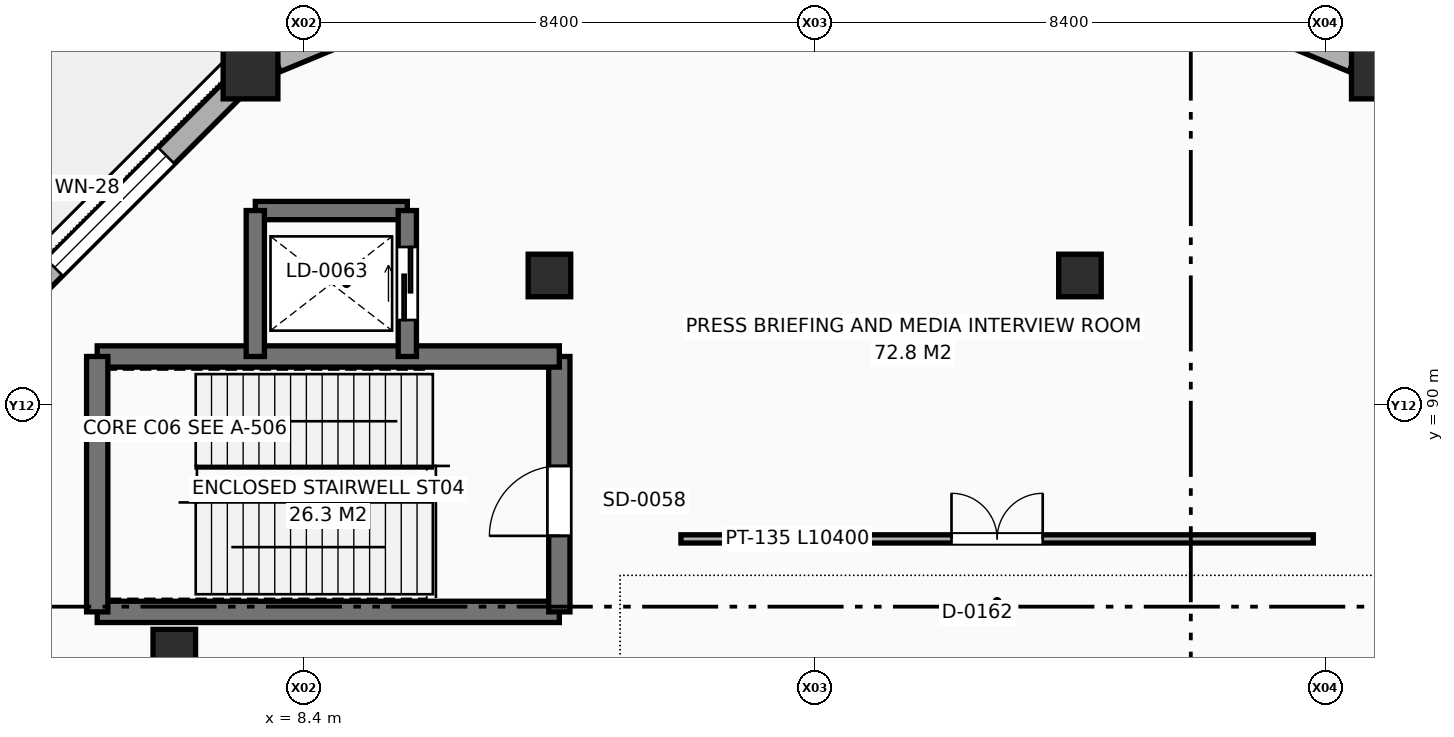
"""IFC4 building model, lengths in metres.
Left out: names, types, materials, properties, quantities, classifications, styles, units other than length and angle.
Written with IfcOpenShell. Run it as: python <this file> out.ifc"""

import sys

from ifc_helpers import new_model, si_unit, direction, frame, frame_2d, origin, origin_2d, place, context, subcontext, project, spatial, rectangle, circle, extrude, element, fill, save


model = new_model("IFC4")
c1 = context("Model", 3, precision=1e-05, world=origin(), true_north=direction((0.0, 1.0)))
c2 = subcontext(c1, "Body", "Model", "MODEL_VIEW")
j1 = project(units=[si_unit("LENGTHUNIT", "METRE"), si_unit("PLANEANGLEUNIT", "RADIAN")], contexts=[c1])
p1 = place(None, origin())
s1 = spatial("IfcSite", under=j1, at=p1, CompositionType="ELEMENT")
p2 = place(p1, origin())
s2 = spatial("IfcBuilding", under=s1, at=p2, CompositionType="ELEMENT")
p3 = place(p2, origin())
s3 = spatial("IfcBuildingStorey", under=s2, at=p3, CompositionType="ELEMENT", Elevation=0.0)
for number, where, z_axis, x_axis in (
    (1, (26.079, 95.486, 0.0), (0.0, 0.0, 1.0), (1.0, 0.0, 0.0)),
    (2, (7.521, 95.486, 0.0), (0.0, 0.0, 1.0), (1.0, 0.0, 0.0)),
):
    element("IfcColumn", number, at=place(p3, frame(where, z_axis=z_axis, x_axis=x_axis)), inside=s3, PredefinedType="COLUMN", context=c2, shape_type="SweptSolid", body=[
        extrude(circle(Radius=0.45, at=origin_2d()), origin(), (0.0, 0.0, 1.0), 5.4),
    ])
for number, where, z_axis, x_axis in (
    (3, (21.163, 92.132, 0.0), (0.0, 0.0, 1.0), (1.0, 0.0, 0.0)),
    (4, (12.438, 92.132, 0.0), (0.0, 0.0, 1.0), (1.0, 0.0, 0.0)),
    (5, (6.268, 85.963, 0.0), (0.0, 0.0, 1.0), (1.0, 0.0, 0.0)),
):
    element("IfcColumn", number, at=place(p3, frame(where, z_axis=z_axis, x_axis=x_axis)), inside=s3, PredefinedType="COLUMN", context=c2, shape_type="SweptSolid", body=[
        extrude(circle(Radius=0.35, at=origin_2d()), origin(), (0.0, 0.0, 1.0), 5.4),
    ])
p4 = place(p3, frame((25.661, 95.659, 0.0), z_axis=(0.0, 0.0, 1.0), x_axis=(-0.923880572778, 0.382680920931, 0.0)))
e6 = element("IfcWall", 6, at=p4, inside=s3, PredefinedType="SOLIDWALL", context=c2, shape_type="SweptSolid", body=[
    extrude(rectangle(XDim=5.612, YDim=0.38, at=frame_2d((2.806, 0.0))), origin(), (0.0, 0.0, 1.0), 4.33),
])
p5 = place(p4, frame((1.881, 0.0, 0.9)))
e7 = element("IfcOpeningElement", 7, at=p5, cuts=e6, PredefinedType="OPENING", context=c2, shape_type="SweptSolid", body=[
    extrude(rectangle(XDim=1.85, YDim=1.5, at=frame_2d((0.925, 0.75))), frame((0.0, 0.2, 0.0), z_axis=(0.0, -1.0, 0.0), x_axis=(1.0, 0.0, 0.0)), (0.0, 0.0, 1.0), 0.4),
])
p6 = place(p3, frame((13.124, 97.807, 0.0), z_axis=(0.0, 0.0, 1.0), x_axis=(-0.923880572778, -0.382680920931, 0.0)))
e8 = element("IfcWall", 8, at=p6, inside=s3, PredefinedType="SOLIDWALL", context=c2, shape_type="SweptSolid", body=[
    extrude(rectangle(XDim=5.612, YDim=0.38, at=frame_2d((2.806, 0.0))), origin(), (0.0, 0.0, 1.0), 4.33),
])
p7 = place(p6, frame((1.681, 0.0, 0.9)))
e9 = element("IfcOpeningElement", 9, at=p7, cuts=e8, PredefinedType="OPENING", context=c2, shape_type="SweptSolid", body=[
    extrude(rectangle(XDim=2.25, YDim=1.5, at=frame_2d((1.125, 0.75))), frame((0.0, 0.2, 0.0), z_axis=(0.0, -1.0, 0.0), x_axis=(1.0, 0.0, 0.0)), (0.0, 0.0, 1.0), 0.4),
])
p8 = place(p3, frame((7.202, 95.167, 0.0), z_axis=(0.0, 0.0, 1.0), x_axis=(-0.707085031082, -0.707128530622, 0.0)))
e10 = element("IfcWall", 10, at=p8, inside=s3, PredefinedType="SOLIDWALL", context=c2, shape_type="SweptSolid", body=[
    extrude(rectangle(XDim=5.613, YDim=0.38, at=frame_2d((2.806, 0.0))), origin(), (0.0, 0.0, 1.0), 4.33),
])
p9 = place(p8, frame((1.506, 0.0, 0.9)))
e11 = element("IfcOpeningElement", 11, at=p9, cuts=e10, PredefinedType="OPENING", context=c2, shape_type="SweptSolid", body=[
    extrude(rectangle(XDim=2.6, YDim=1.6, at=frame_2d((1.3, 0.8))), frame((0.0, 0.2, 0.0), z_axis=(0.0, -1.0, 0.0), x_axis=(1.0, 0.0, 0.0)), (0.0, 0.0, 1.0), 0.4),
])
p10 = place(p3, frame((5.0, 86.6, 0.0), z_axis=(0.0, 0.0, 1.0), x_axis=(1.0, 0.0, 0.0)))
e12 = element("IfcWall", 12, at=p10, inside=s3, PredefinedType="SHEAR", context=c2, shape_type="SweptSolid", body=[
    extrude(rectangle(XDim=7.6, YDim=0.35, at=frame_2d((3.8, 0.0))), origin(), (0.0, 0.0, 1.0), 5.12),
])
p11 = place(p3, frame((12.6, 86.6, 0.0), z_axis=(0.0, 0.0, 1.0), x_axis=(0.0, 1.0, 0.0)))
e13 = element("IfcWall", 13, at=p11, inside=s3, PredefinedType="SHEAR", context=c2, shape_type="SweptSolid", body=[
    extrude(rectangle(XDim=4.2, YDim=0.35, at=frame_2d((2.1, 0.0))), origin(), (0.0, 0.0, 1.0), 5.12),
])
p12 = place(p11, frame((1.25, 0.0, 0.0)))
e14 = element("IfcOpeningElement", 14, at=p12, cuts=e13, PredefinedType="OPENING", context=c2, shape_type="SweptSolid", body=[
    extrude(rectangle(XDim=1.15, YDim=2.2, at=frame_2d((0.575, 1.1))), frame((0.0, 0.185, 0.0), z_axis=(0.0, -1.0, 0.0), x_axis=(1.0, 0.0, 0.0)), (0.0, 0.0, 1.0), 0.37),
])
p13 = place(p3, frame((12.6, 90.8, 0.0), z_axis=(0.0, 0.0, 1.0), x_axis=(-1.0, 0.0, 0.0)))
e15 = element("IfcWall", 15, at=p13, inside=s3, PredefinedType="SHEAR", context=c2, shape_type="SweptSolid", body=[
    extrude(rectangle(XDim=7.6, YDim=0.35, at=frame_2d((3.8, 0.0))), origin(), (0.0, 0.0, 1.0), 5.12),
])
p14 = place(p3, frame((5.0, 90.8, 0.0), z_axis=(0.0, 0.0, 1.0), x_axis=(0.0, -1.0, 0.0)))
e16 = element("IfcWall", 16, at=p14, inside=s3, PredefinedType="SHEAR", context=c2, shape_type="SweptSolid", body=[
    extrude(rectangle(XDim=4.2, YDim=0.35, at=frame_2d((2.1, 0.0))), origin(), (0.0, 0.0, 1.0), 5.12),
])
p15 = place(p3, frame((10.1, 93.2, 0.0), z_axis=(0.0, 0.0, 1.0), x_axis=(-1.0, 0.0, 0.0)))
e17 = element("IfcWall", 17, at=p15, inside=s3, PredefinedType="SHEAR", context=c2, shape_type="SweptSolid", body=[
    extrude(rectangle(XDim=2.5, YDim=0.3, at=frame_2d((1.25, 0.0))), origin(), (0.0, 0.0, 1.0), 5.12),
])
p16 = place(p3, frame((7.6, 93.2, 0.0), z_axis=(0.0, 0.0, 1.0), x_axis=(0.0, -1.0, 0.0)))
e18 = element("IfcWall", 18, at=p16, inside=s3, PredefinedType="SHEAR", context=c2, shape_type="SweptSolid", body=[
    extrude(rectangle(XDim=2.4, YDim=0.3, at=frame_2d((1.2, 0.0))), origin(), (0.0, 0.0, 1.0), 5.12),
])
p17 = place(p3, frame((10.1, 90.8, 0.0), z_axis=(0.0, 0.0, 1.0), x_axis=(0.0, 1.0, 0.0)))
e19 = element("IfcWall", 19, at=p17, inside=s3, PredefinedType="SHEAR", context=c2, shape_type="SweptSolid", body=[
    extrude(rectangle(XDim=2.4, YDim=0.3, at=frame_2d((1.2, 0.0))), origin(), (0.0, 0.0, 1.0), 5.12),
])
p18 = place(p17, frame((0.6, 0.0, 0.0)))
e20 = element("IfcOpeningElement", 20, at=p18, cuts=e19, PredefinedType="OPENING", context=c2, shape_type="SweptSolid", body=[
    extrude(rectangle(XDim=1.2, YDim=2.25, at=frame_2d((0.6, 1.125))), frame((0.0, 0.16, 0.0), z_axis=(0.0, -1.0, 0.0), x_axis=(1.0, 0.0, 0.0)), (0.0, 0.0, 1.0), 0.32),
])
p19 = place(p3, frame((14.6, 87.8, 0.0), z_axis=(0.0, 0.0, 1.0), x_axis=(1.0, 0.0, 0.0)))
e21 = element("IfcWall", 21, at=p19, inside=s3, PredefinedType="PARTITIONING", context=c2, shape_type="SweptSolid", body=[
    extrude(rectangle(XDim=10.4, YDim=0.135, at=frame_2d((5.2, 0.0))), origin(), (0.0, 0.0, 1.0), 5.06),
])
p20 = place(p19, frame((4.45, 0.0, 0.0)))
e22 = element("IfcOpeningElement", 22, at=p20, cuts=e21, PredefinedType="OPENING", context=c2, shape_type="SweptSolid", body=[
    extrude(rectangle(XDim=1.5, YDim=2.35, at=frame_2d((0.75, 1.175))), frame((0.0, 0.077, 0.0), z_axis=(0.0, -1.0, 0.0), x_axis=(1.0, 0.0, 0.0)), (0.0, 0.0, 1.0), 0.155),
])
p21 = place(p9, origin())
e23 = element("IfcWindow", 23, at=p21, inside=s3, PartitioningType="SINGLE_PANEL", PredefinedType="WINDOW", context=c2, shape_type="SweptSolid", body=[
    extrude(rectangle(XDim=2.6, YDim=1.6, at=frame_2d((1.3, 0.8))), frame((0.0, 0.03, 0.0), z_axis=(0.0, -1.0, 0.0), x_axis=(1.0, 0.0, 0.0)), (0.0, 0.0, 1.0), 0.06),
])
fill(e11, e23)
p22 = place(p12, frame((1.15, 0.0, 0.0), z_axis=(0.0, 0.0, 1.0), x_axis=(-1.0, 0.0, 0.0)))
e24 = element("IfcDoor", 24, at=p22, inside=s3, OperationType="SINGLE_SWING_LEFT", PredefinedType="DOOR", context=c2, shape_type="SweptSolid", body=[
    extrude(rectangle(XDim=1.15, YDim=2.2, at=frame_2d((0.575, 1.1))), frame((0.0, 0.025, 0.0), z_axis=(0.0, -1.0, 0.0), x_axis=(1.0, 0.0, 0.0)), (0.0, 0.0, 1.0), 0.05),
])
fill(e14, e24)
p23 = place(p18, origin())
e25 = element("IfcDoor", 25, at=p23, inside=s3, OperationType="SLIDING_TO_LEFT", PredefinedType="DOOR", context=c2, shape_type="SweptSolid", body=[
    extrude(rectangle(XDim=1.2, YDim=2.25, at=frame_2d((0.6, 1.125))), frame((0.0, 0.025, 0.0), z_axis=(0.0, -1.0, 0.0), x_axis=(1.0, 0.0, 0.0)), (0.0, 0.0, 1.0), 0.05),
])
fill(e20, e25)
p24 = place(p20, origin())
e26 = element("IfcDoor", 26, at=p24, inside=s3, OperationType="DOUBLE_DOOR_SINGLE_SWING", PredefinedType="DOOR", context=c2, shape_type="SweptSolid", body=[
    extrude(rectangle(XDim=1.5, YDim=2.35, at=frame_2d((0.75, 1.175))), frame((0.0, 0.025, 0.0), z_axis=(0.0, -1.0, 0.0), x_axis=(1.0, 0.0, 0.0)), (0.0, 0.0, 1.0), 0.05),
])
fill(e22, e26)
save(model, sys.argv[1])
